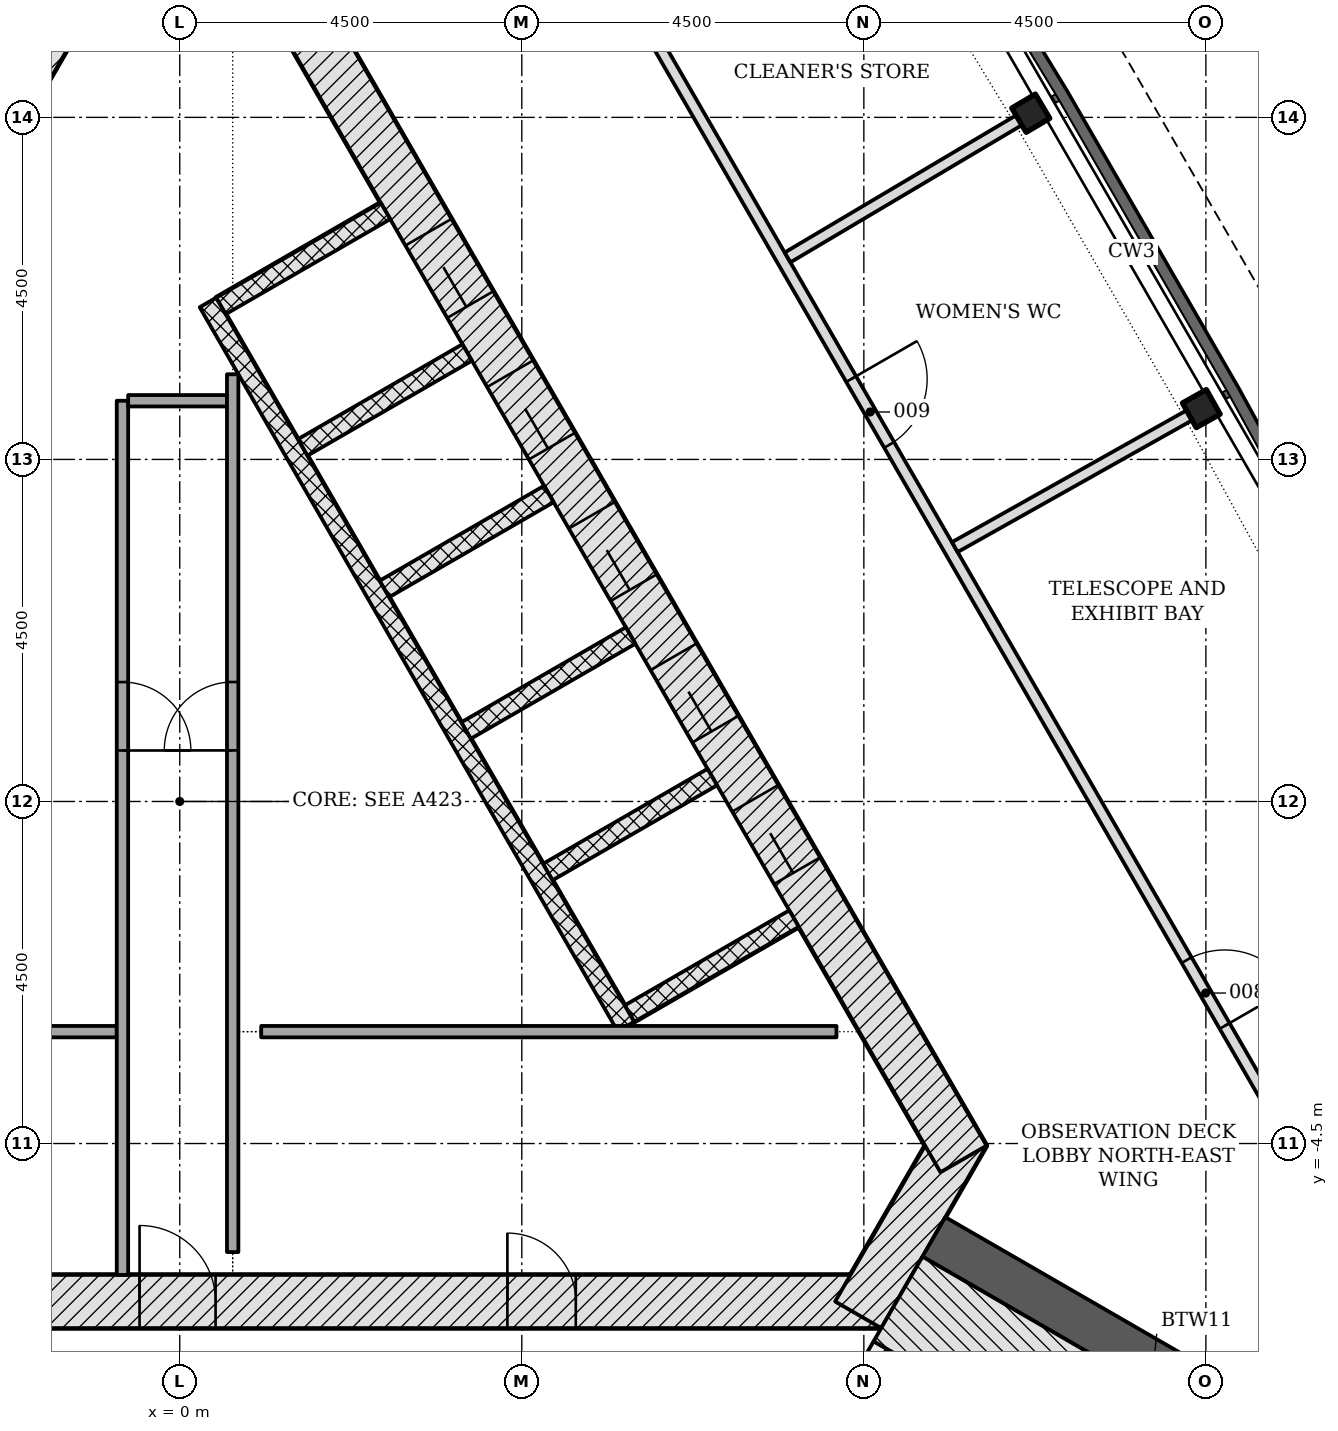
"""IFC4 building model, lengths in metres.
Left out: names, types, materials, properties, quantities, classifications, styles, units other than length and angle.
Written with IfcOpenShell. Run it as: python <this file> out.ifc"""

import sys

from ifc_helpers import new_model, si_unit, direction, frame, frame_2d, origin, origin_2d, place, context, subcontext, project, spatial, polyline, rectangle, i_section, outline, extrude, element, fill, save


model = new_model("IFC4")
c1 = context("Model", 3, precision=1e-05, world=origin(), true_north=direction((0.0, 1.0)))
c2 = subcontext(c1, "Body", "Model", "MODEL_VIEW")
j1 = project(units=[si_unit("LENGTHUNIT", "METRE"), si_unit("PLANEANGLEUNIT", "RADIAN")], contexts=[c1])
p1 = place(None, origin())
s1 = spatial("IfcSite", under=j1, at=p1, CompositionType="ELEMENT")
p2 = place(p1, origin())
s2 = spatial("IfcBuilding", under=s1, at=p2, CompositionType="ELEMENT")
p3 = place(p2, frame((0.0, 0.0, 274.2)))
s3 = spatial("IfcBuildingStorey", under=s2, at=p3, CompositionType="ELEMENT", Elevation=274.2)
p4 = place(p3, frame((-9.229, -6.578, -0.2), z_axis=(0.0, 0.0, 1.0), x_axis=(1.0, 0.0, 0.0)))
e1 = element("IfcWall", 1, at=p4, inside=s3, PredefinedType="SHEAR", context=c2, shape_type="SweptSolid", body=[
    extrude(rectangle(XDim=18.458, YDim=0.7, at=frame_2d((9.229, 0.0))), origin(), (0.0, 0.0, 1.0), 5.35),
])
p5 = place(p4, frame((8.7, 0.0, 0.2)))
e2 = element("IfcOpeningElement", 2, at=p5, cuts=e1, PredefinedType="OPENING", context=c2, shape_type="SweptSolid", body=[
    extrude(rectangle(XDim=1.0, YDim=2.1, at=frame_2d((0.5, 1.05))), frame((0.0, 0.36, 0.0), z_axis=(0.0, -1.0, 0.0), x_axis=(1.0, 0.0, 0.0)), (0.0, 0.0, 1.0), 0.72),
])
p6 = place(p4, frame((3.99, 0.0, 0.2)))
e3 = element("IfcOpeningElement", 3, at=p6, cuts=e1, PredefinedType="OPENING", context=c2, shape_type="SweptSolid", body=[
    extrude(rectangle(XDim=0.9, YDim=2.1, at=frame_2d((0.45, 1.05))), frame((0.0, 0.36, 0.0), z_axis=(0.0, -1.0, 0.0), x_axis=(1.0, 0.0, 0.0)), (0.0, 0.0, 1.0), 0.72),
])
p7 = place(p4, frame((13.539, 0.0, 0.2)))
e4 = element("IfcOpeningElement", 4, at=p7, cuts=e1, PredefinedType="OPENING", context=c2, shape_type="SweptSolid", body=[
    extrude(rectangle(XDim=0.9, YDim=2.1, at=frame_2d((0.45, 1.05))), frame((0.0, 0.36, 0.0), z_axis=(0.0, -1.0, 0.0), x_axis=(1.0, 0.0, 0.0)), (0.0, 0.0, 1.0), 0.72),
])
p8 = place(p3, frame((8.926, -6.753, -0.2), z_axis=(0.0, 0.0, 1.0), x_axis=(0.500042739161, 0.866000726912, 0.0)))
e5 = element("IfcWall", 5, at=p8, inside=s3, PredefinedType="SHEAR", context=c2, shape_type="SweptSolid", body=[
    extrude(rectangle(XDim=2.771, YDim=0.7, at=frame_2d((1.386, 0.0))), origin(), (0.0, 0.0, 1.0), 5.35),
])
p9 = place(p3, frame((10.311, -4.703, -0.2), z_axis=(0.0, 0.0, 1.0), x_axis=(-0.500001446645, 0.866024568562, 0.0)))
e6 = element("IfcWall", 6, at=p9, inside=s3, PredefinedType="SHEAR", context=c2, shape_type="SweptSolid", body=[
    extrude(rectangle(XDim=18.458, YDim=0.7, at=frame_2d((9.229, 0.0))), origin(), (0.0, 0.0, 1.0), 5.35),
])
p10 = place(p9, frame((4.379, 0.0, 0.2)))
e7 = element("IfcOpeningElement", 7, at=p10, cuts=e6, PredefinedType="OPENING", context=c2, shape_type="SweptSolid", body=[
    extrude(rectangle(XDim=1.1, YDim=2.1, at=frame_2d((0.55, 1.05))), frame((0.0, 0.36, 0.0), z_axis=(0.0, -1.0, 0.0), x_axis=(1.0, 0.0, 0.0)), (0.0, 0.0, 1.0), 0.72),
])
p11 = place(p9, frame((6.529, 0.0, 0.2)))
e8 = element("IfcOpeningElement", 8, at=p11, cuts=e6, PredefinedType="OPENING", context=c2, shape_type="SweptSolid", body=[
    extrude(rectangle(XDim=1.1, YDim=2.1, at=frame_2d((0.55, 1.05))), frame((0.0, 0.36, 0.0), z_axis=(0.0, -1.0, 0.0), x_axis=(1.0, 0.0, 0.0)), (0.0, 0.0, 1.0), 0.72),
])
p12 = place(p9, frame((8.679, 0.0, 0.2)))
e9 = element("IfcOpeningElement", 9, at=p12, cuts=e6, PredefinedType="OPENING", context=c2, shape_type="SweptSolid", body=[
    extrude(rectangle(XDim=1.1, YDim=2.1, at=frame_2d((0.55, 1.05))), frame((0.0, 0.36, 0.0), z_axis=(0.0, -1.0, 0.0), x_axis=(1.0, 0.0, 0.0)), (0.0, 0.0, 1.0), 0.72),
])
p13 = place(p9, frame((10.829, 0.0, 0.2)))
e10 = element("IfcOpeningElement", 10, at=p13, cuts=e6, PredefinedType="OPENING", context=c2, shape_type="SweptSolid", body=[
    extrude(rectangle(XDim=1.1, YDim=2.1, at=frame_2d((0.55, 1.05))), frame((0.0, 0.36, 0.0), z_axis=(0.0, -1.0, 0.0), x_axis=(1.0, 0.0, 0.0)), (0.0, 0.0, 1.0), 0.72),
])
p14 = place(p9, frame((12.979, 0.0, 0.2)))
e11 = element("IfcOpeningElement", 11, at=p14, cuts=e6, PredefinedType="OPENING", context=c2, shape_type="SweptSolid", body=[
    extrude(rectangle(XDim=1.1, YDim=2.1, at=frame_2d((0.55, 1.05))), frame((0.0, 0.36, 0.0), z_axis=(0.0, -1.0, 0.0), x_axis=(1.0, 0.0, 0.0)), (0.0, 0.0, 1.0), 0.72),
])
p15 = place(p3, frame((-1.083, 11.281, -0.2), z_axis=(0.0, 0.0, 1.0), x_axis=(-0.500001446645, -0.866024568562, 0.0)))
e12 = element("IfcWall", 12, at=p15, inside=s3, PredefinedType="SHEAR", context=c2, shape_type="SweptSolid", body=[
    extrude(rectangle(XDim=18.458, YDim=0.7, at=frame_2d((9.229, 0.0))), origin(), (0.0, 0.0, 1.0), 5.35),
])
p16 = place(p15, frame((8.979, 0.0, 0.2)))
e13 = element("IfcOpeningElement", 13, at=p16, cuts=e12, PredefinedType="OPENING", context=c2, shape_type="SweptSolid", body=[
    extrude(rectangle(XDim=1.2, YDim=2.1, at=frame_2d((0.6, 1.05))), frame((0.0, 0.36, 0.0), z_axis=(0.0, -1.0, 0.0), x_axis=(1.0, 0.0, 0.0)), (0.0, 0.0, 1.0), 0.72),
])
p17 = place(p15, frame((11.029, 0.0, 0.2)))
e14 = element("IfcOpeningElement", 14, at=p17, cuts=e12, PredefinedType="OPENING", context=c2, shape_type="SweptSolid", body=[
    extrude(rectangle(XDim=1.2, YDim=2.1, at=frame_2d((0.6, 1.05))), frame((0.0, 0.36, 0.0), z_axis=(0.0, -1.0, 0.0), x_axis=(1.0, 0.0, 0.0)), (0.0, 0.0, 1.0), 0.72),
])
p18 = place(p15, frame((13.179, 0.0, 0.2)))
e15 = element("IfcOpeningElement", 15, at=p18, cuts=e12, PredefinedType="OPENING", context=c2, shape_type="SweptSolid", body=[
    extrude(rectangle(XDim=1.3, YDim=2.1, at=frame_2d((0.65, 1.05))), frame((0.0, 0.36, 0.0), z_axis=(0.0, -1.0, 0.0), x_axis=(1.0, 0.0, 0.0)), (0.0, 0.0, 1.0), 0.72),
])
p19 = place(p3, frame((9.922, -5.728, -0.2), z_axis=(0.0, 0.0, 1.0), x_axis=(0.866032176823, -0.499988268569, 0.0)))
e16 = element("IfcWall", 16, at=p19, inside=s3, PredefinedType="SHEAR", context=c2, shape_type="SweptSolid", body=[
    extrude(rectangle(XDim=6.678, YDim=0.6, at=frame_2d((3.339, 0.0))), origin(), (0.0, 0.0, 1.0), 5.35),
])
for number, where, z_axis, x_axis in (
    (17, (13.44, 5.169, -0.2), (0.0, 0.0, 1.0), (-0.49, 0.872, 0.0)),
    (18, (11.196, 9.055, -0.2), (0.0, 0.0, 1.0), (-0.51, 0.86, 0.0)),
):
    element("IfcColumn", number, at=place(p3, frame(where, z_axis=z_axis, x_axis=x_axis)), inside=s3, PredefinedType="COLUMN", context=c2, shape_type="SweptSolid", body=[
        extrude(i_section(OverallWidth=0.371, OverallDepth=0.361, WebThickness=0.012, FlangeThickness=0.02, FilletRadius=0.015, at=origin_2d()), origin(), (0.0, 0.0, 1.0), 5.35),
    ])
p20 = place(p3, origin())
e19 = element("IfcWall", 19, at=p20, inside=s3, PredefinedType="NOTDEFINED", context=c2, shape_type="SweptSolid", body=[
    extrude(outline(polyline([(11.244, -14.46), (13.211, -14.336), (14.708, -14.069), (16.111, -13.485), (17.355, -12.611), (18.381, -11.49), (19.141, -10.174), (19.599, -8.724), (19.733, -7.21), (19.538, -5.703), (19.021, -4.273), (18.145, -2.507), (17.876, -2.64), (18.745, -4.391), (19.244, -5.774), (19.432, -7.216), (19.303, -8.665), (18.865, -10.052), (18.138, -11.312), (17.156, -12.385), (15.965, -13.22), (14.623, -13.779), (13.176, -14.038), (11.225, -14.161), (11.244, -14.46)])), origin(), (0.0, 0.0, 1.0), 5.15),
])
for number, where, z_axis, x_axis in (
    (20, (8.081, -1.541, -0.2), (0.0, 0.0, 1.0), (-0.866, -0.5, 0.0)),
    (21, (7.006, 0.321, -0.2), (0.0, 0.0, 1.0), (-0.866, -0.5, 0.0)),
):
    element("IfcWall", number, at=place(p3, frame(where, z_axis=z_axis, x_axis=x_axis)), inside=s3, PredefinedType="PARTITIONING", context=c2, shape_type="SweptSolid", body=[
        extrude(rectangle(XDim=2.5, YDim=0.25, at=frame_2d((1.25, 0.0))), origin(), (0.0, 0.0, 1.0), 5.35),
    ])
p21 = place(p3, frame((5.931, 2.183, -0.2), z_axis=(0.0, 0.0, 1.0), x_axis=(-0.866047370643, -0.499961950354, 0.0)))
e22 = element("IfcWall", 22, at=p21, inside=s3, PredefinedType="PARTITIONING", context=c2, shape_type="SweptSolid", body=[
    extrude(rectangle(XDim=2.5, YDim=0.25, at=frame_2d((1.25, 0.0))), origin(), (0.0, 0.0, 1.0), 5.35),
])
for number, where, z_axis, x_axis in (
    (23, (4.856, 4.045, -0.2), (0.0, 0.0, 1.0), (-0.866, -0.5, 0.0)),
    (24, (3.781, 5.907, -0.2), (0.0, 0.0, 1.0), (-0.866, -0.5, 0.0)),
    (25, (2.706, 7.769, -0.2), (0.0, 0.0, 1.0), (-0.866, -0.5, 0.0)),
):
    element("IfcWall", number, at=place(p3, frame(where, z_axis=z_axis, x_axis=x_axis)), inside=s3, PredefinedType="PARTITIONING", context=c2, shape_type="SweptSolid", body=[
        extrude(rectangle(XDim=2.5, YDim=0.25, at=frame_2d((1.25, 0.0))), origin(), (0.0, 0.0, 1.0), 5.35),
    ])
p22 = place(p3, frame((5.87, -2.961, 0.0), z_axis=(0.0, 0.0, 1.0), x_axis=(-0.50000615651, 0.866021849293, 0.0)))
e26 = element("IfcWall", 26, at=p22, inside=s3, PredefinedType="PARTITIONING", context=c2, shape_type="SweptSolid", body=[
    extrude(rectangle(XDim=11.0, YDim=0.25, at=frame_2d((5.5, 0.0))), origin(), (0.0, 0.0, 1.0), 5.15),
])
p23 = place(p3, frame((-5.258, -3.028, 0.0), z_axis=(0.0, 0.0, 1.0), x_axis=(1.0, 0.0, 0.0)))
e27 = element("IfcWall", 27, at=p23, inside=s3, PredefinedType="PARTITIONING", context=c2, shape_type="SweptSolid", body=[
    extrude(rectangle(XDim=4.429, YDim=0.15, at=frame_2d((2.215, 0.0))), origin(), (0.0, 0.0, 1.0), 5.15),
])
p24 = place(p3, frame((-0.754, 5.272, 0.0), z_axis=(0.0, 0.0, 1.0), x_axis=(0.0, -1.0, 0.0)))
e28 = element("IfcWall", 28, at=p24, inside=s3, PredefinedType="PARTITIONING", context=c2, shape_type="SweptSolid", body=[
    extrude(rectangle(XDim=11.5, YDim=0.15, at=frame_2d((5.75, 0.0))), origin(), (0.0, 0.0, 1.0), 5.15),
])
p25 = place(p24, frame((3.701, 0.0, 0.0)))
e29 = element("IfcOpeningElement", 29, at=p25, cuts=e28, PredefinedType="OPENING", context=c2, shape_type="SweptSolid", body=[
    extrude(rectangle(XDim=0.9, YDim=2.1, at=frame_2d((0.45, 1.05))), frame((0.0, 0.085, 0.0), z_axis=(0.0, -1.0, 0.0), x_axis=(1.0, 0.0, 0.0)), (0.0, 0.0, 1.0), 0.17),
])
p26 = place(p3, frame((-0.679, 5.272, 0.0), z_axis=(0.0, 0.0, 1.0), x_axis=(1.0, 0.0, 0.0)))
e30 = element("IfcWall", 30, at=p26, inside=s3, PredefinedType="PARTITIONING", context=c2, shape_type="SweptSolid", body=[
    extrude(rectangle(XDim=1.3, YDim=0.15, at=frame_2d((0.65, 0.0))), origin(), (0.0, 0.0, 1.0), 5.15),
])
p27 = place(p3, frame((0.696, -5.928, 0.0), z_axis=(0.0, 0.0, 1.0), x_axis=(0.0, 1.0, 0.0)))
e31 = element("IfcWall", 31, at=p27, inside=s3, PredefinedType="PARTITIONING", context=c2, shape_type="SweptSolid", body=[
    extrude(rectangle(XDim=11.549, YDim=0.15, at=frame_2d((5.774, 0.0))), origin(), (0.0, 0.0, 1.0), 5.15),
])
p28 = place(p27, frame((6.6, 0.0, 0.0)))
e32 = element("IfcOpeningElement", 32, at=p28, cuts=e31, PredefinedType="OPENING", context=c2, shape_type="SweptSolid", body=[
    extrude(rectangle(XDim=0.9, YDim=2.1, at=frame_2d((0.45, 1.05))), frame((0.0, 0.085, 0.0), z_axis=(0.0, -1.0, 0.0), x_axis=(1.0, 0.0, 0.0)), (0.0, 0.0, 1.0), 0.17),
])
p29 = place(p3, frame((1.071, -3.028, 0.0), z_axis=(0.0, 0.0, 1.0), x_axis=(1.0, 0.0, 0.0)))
e33 = element("IfcWall", 33, at=p29, inside=s3, PredefinedType="PARTITIONING", context=c2, shape_type="SweptSolid", body=[
    extrude(rectangle(XDim=7.569, YDim=0.15, at=frame_2d((3.784, 0.0))), origin(), (0.0, 0.0, 1.0), 5.15),
])
p30 = place(p3, frame((7.44, -10.226, -0.2), z_axis=(0.0, 0.0, 1.0), x_axis=(0.500022077904, 0.866012656725, 0.0)))
e34 = element("IfcWall", 34, at=p30, inside=s3, PredefinedType="SHEAR", context=c2, shape_type="SweptSolid", body=[
    extrude(rectangle(XDim=3.55, YDim=0.2, at=frame_2d((1.775, 0.0))), origin(), (0.0, 0.0, 1.0), 5.35),
])
p31 = place(p30, frame((1.175, 0.0, 0.2)))
e35 = element("IfcOpeningElement", 35, at=p31, cuts=e34, PredefinedType="OPENING", context=c2, shape_type="SweptSolid", body=[
    extrude(rectangle(XDim=1.2, YDim=2.1, at=frame_2d((0.6, 1.05))), frame((0.0, 0.11, 0.0), z_axis=(0.0, -1.0, 0.0), x_axis=(1.0, 0.0, 0.0)), (0.0, 0.0, 1.0), 0.22),
])
p32 = place(p3, frame((9.45, -6.545, -0.2), z_axis=(0.0, 0.0, 1.0), x_axis=(0.866016347338, -0.500015685897, 0.0)))
e36 = element("IfcWall", 36, at=p32, inside=s3, PredefinedType="SHEAR", context=c2, shape_type="SweptSolid", body=[
    extrude(rectangle(XDim=6.678, YDim=1.286, at=frame_2d((3.339, 0.0))), origin(), (0.0, 0.0, 1.0), 5.35),
])
p33 = place(p3, frame((6.078, 10.329, 0.0), z_axis=(0.0, 0.0, 1.0), x_axis=(0.499992222505, -0.866029894076, 0.0)))
e37 = element("IfcWall", 37, at=p33, inside=s3, PredefinedType="PARTITIONING", context=c2, shape_type="SweptSolid", body=[
    extrude(rectangle(XDim=21.439, YDim=0.15, at=frame_2d((10.719, 0.0))), origin(), (0.0, 0.0, 1.0), 4.602),
])
p34 = place(p33, frame((14.337, 0.0, 0.0)))
e38 = element("IfcOpeningElement", 38, at=p34, cuts=e37, PredefinedType="OPENING", context=c2, shape_type="SweptSolid", body=[
    extrude(rectangle(XDim=1.0, YDim=2.1, at=frame_2d((0.5, 1.05))), frame((0.0, 0.085, 0.0), z_axis=(0.0, -1.0, 0.0), x_axis=(1.0, 0.0, 0.0)), (0.0, 0.0, 1.0), 0.17),
])
p35 = place(p33, frame((5.51, 0.0, 0.0)))
e39 = element("IfcOpeningElement", 39, at=p35, cuts=e37, PredefinedType="OPENING", context=c2, shape_type="SweptSolid", body=[
    extrude(rectangle(XDim=1.0, YDim=2.1, at=frame_2d((0.5, 1.05))), frame((0.0, 0.085, 0.0), z_axis=(0.0, -1.0, 0.0), x_axis=(1.0, 0.0, 0.0)), (0.0, 0.0, 1.0), 0.17),
])
for number, where, z_axis, x_axis in (
    (40, (10.197, 3.346, 0.0), (0.0, 0.0, 1.0), (0.872, 0.49, 0.0)),
    (41, (7.997, 7.158, 0.0), (0.0, 0.0, 1.0), (0.86, 0.51, 0.0)),
):
    element("IfcWall", number, at=place(p3, frame(where, z_axis=z_axis, x_axis=x_axis)), inside=s3, PredefinedType="PARTITIONING", context=c2, shape_type="SweptSolid", body=[
        extrude(rectangle(XDim=3.545, YDim=0.15, at=frame_2d((1.772, 0.0))), origin(), (0.0, 0.0, 1.0), 4.602),
    ])
p36 = place(p10, origin())
e42 = element("IfcDoor", 42, at=p36, inside=s3, OperationType="DOUBLE_DOOR_SLIDING", PredefinedType="DOOR", context=c2, shape_type="SweptSolid", body=[
    extrude(rectangle(XDim=1.1, YDim=2.1, at=frame_2d((0.55, 1.05))), frame((0.0, 0.025, 0.0), z_axis=(0.0, -1.0, 0.0), x_axis=(1.0, 0.0, 0.0)), (0.0, 0.0, 1.0), 0.05),
])
fill(e7, e42)
p37 = place(p11, origin())
e43 = element("IfcDoor", 43, at=p37, inside=s3, OperationType="DOUBLE_DOOR_SLIDING", PredefinedType="DOOR", context=c2, shape_type="SweptSolid", body=[
    extrude(rectangle(XDim=1.1, YDim=2.1, at=frame_2d((0.55, 1.05))), frame((0.0, 0.025, 0.0), z_axis=(0.0, -1.0, 0.0), x_axis=(1.0, 0.0, 0.0)), (0.0, 0.0, 1.0), 0.05),
])
fill(e8, e43)
p38 = place(p12, origin())
e44 = element("IfcDoor", 44, at=p38, inside=s3, OperationType="DOUBLE_DOOR_SLIDING", PredefinedType="DOOR", context=c2, shape_type="SweptSolid", body=[
    extrude(rectangle(XDim=1.1, YDim=2.1, at=frame_2d((0.55, 1.05))), frame((0.0, 0.025, 0.0), z_axis=(0.0, -1.0, 0.0), x_axis=(1.0, 0.0, 0.0)), (0.0, 0.0, 1.0), 0.05),
])
fill(e9, e44)
p39 = place(p13, origin())
e45 = element("IfcDoor", 45, at=p39, inside=s3, OperationType="DOUBLE_DOOR_SLIDING", PredefinedType="DOOR", context=c2, shape_type="SweptSolid", body=[
    extrude(rectangle(XDim=1.1, YDim=2.1, at=frame_2d((0.55, 1.05))), frame((0.0, 0.025, 0.0), z_axis=(0.0, -1.0, 0.0), x_axis=(1.0, 0.0, 0.0)), (0.0, 0.0, 1.0), 0.05),
])
fill(e10, e45)
p40 = place(p14, origin())
e46 = element("IfcDoor", 46, at=p40, inside=s3, OperationType="DOUBLE_DOOR_SLIDING", PredefinedType="DOOR", context=c2, shape_type="SweptSolid", body=[
    extrude(rectangle(XDim=1.1, YDim=2.1, at=frame_2d((0.55, 1.05))), frame((0.0, 0.025, 0.0), z_axis=(0.0, -1.0, 0.0), x_axis=(1.0, 0.0, 0.0)), (0.0, 0.0, 1.0), 0.05),
])
fill(e11, e46)
p41 = place(p5, origin())
e47 = element("IfcDoor", 47, at=p41, inside=s3, OperationType="SINGLE_SWING_LEFT", PredefinedType="DOOR", context=c2, shape_type="SweptSolid", body=[
    extrude(rectangle(XDim=1.0, YDim=2.1, at=frame_2d((0.5, 1.05))), frame((0.0, 0.075, 0.0), z_axis=(0.0, -1.0, 0.0), x_axis=(1.0, 0.0, 0.0)), (0.0, 0.0, 1.0), 0.15),
])
fill(e2, e47)
p42 = place(p7, origin())
e48 = element("IfcDoor", 48, at=p42, inside=s3, OperationType="SINGLE_SWING_LEFT", PredefinedType="DOOR", context=c2, shape_type="SweptSolid", body=[
    extrude(rectangle(XDim=0.9, YDim=2.1, at=frame_2d((0.45, 1.05))), frame((0.0, 0.075, 0.0), z_axis=(0.0, -1.0, 0.0), x_axis=(1.0, 0.0, 0.0)), (0.0, 0.0, 1.0), 0.15),
])
fill(e4, e48)
p43 = place(p25, origin())
e49 = element("IfcDoor", 49, at=p43, inside=s3, OperationType="SINGLE_SWING_RIGHT", PredefinedType="DOOR", context=c2, shape_type="SweptSolid", body=[
    extrude(rectangle(XDim=0.9, YDim=2.1, at=frame_2d((0.45, 1.05))), frame((0.0, 0.025, 0.0), z_axis=(0.0, -1.0, 0.0), x_axis=(1.0, 0.0, 0.0)), (0.0, 0.0, 1.0), 0.05),
])
fill(e29, e49)
p44 = place(p28, origin())
e50 = element("IfcDoor", 50, at=p44, inside=s3, OperationType="SINGLE_SWING_LEFT", PredefinedType="DOOR", context=c2, shape_type="SweptSolid", body=[
    extrude(rectangle(XDim=0.9, YDim=2.1, at=frame_2d((0.45, 1.05))), frame((0.0, 0.025, 0.0), z_axis=(0.0, -1.0, 0.0), x_axis=(1.0, 0.0, 0.0)), (0.0, 0.0, 1.0), 0.05),
])
fill(e32, e50)
p45 = place(p34, origin())
e51 = element("IfcDoor", 51, at=p45, inside=s3, OperationType="SINGLE_SWING_RIGHT", PredefinedType="DOOR", context=c2, shape_type="SweptSolid", body=[
    extrude(rectangle(XDim=1.0, YDim=2.1, at=frame_2d((0.5, 1.05))), frame((0.0, 0.025, 0.0), z_axis=(0.0, -1.0, 0.0), x_axis=(1.0, 0.0, 0.0)), (0.0, 0.0, 1.0), 0.05),
])
fill(e38, e51)
p46 = place(p35, origin())
e52 = element("IfcDoor", 52, at=p46, inside=s3, OperationType="SINGLE_SWING_LEFT", PredefinedType="DOOR", context=c2, shape_type="SweptSolid", body=[
    extrude(rectangle(XDim=1.0, YDim=2.1, at=frame_2d((0.5, 1.05))), frame((0.0, 0.025, 0.0), z_axis=(0.0, -1.0, 0.0), x_axis=(1.0, 0.0, 0.0)), (0.0, 0.0, 1.0), 0.05),
])
fill(e39, e52)
save(model, sys.argv[1])
